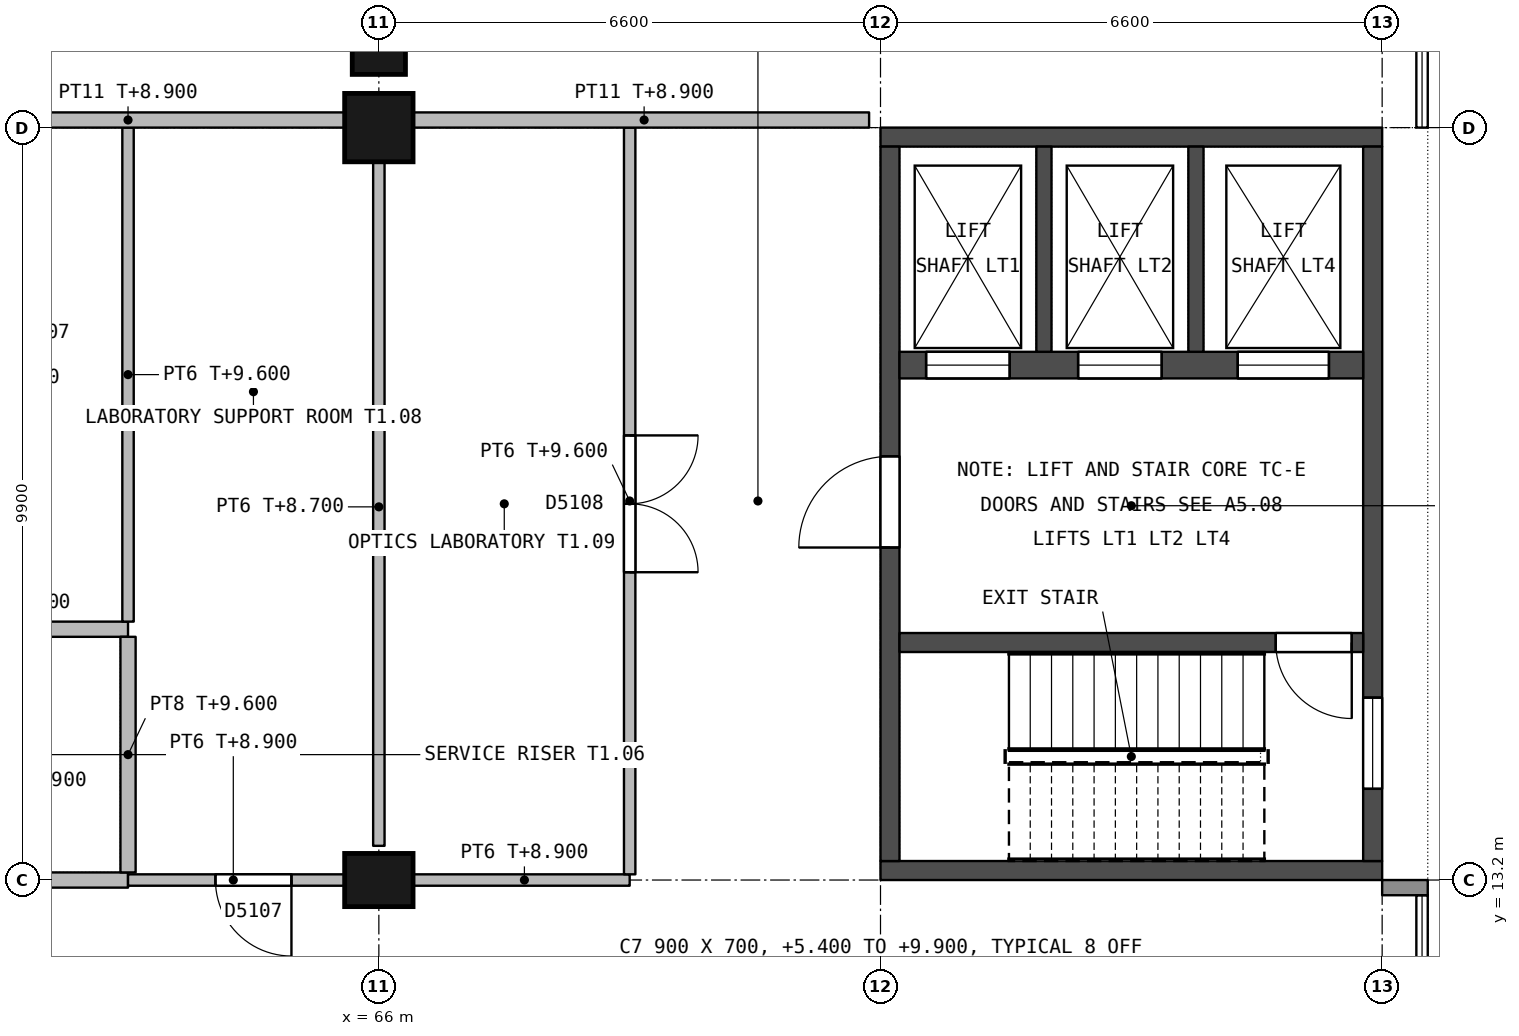
"""IFC4 building model, lengths in metres.
Left out: names, types, materials, properties, quantities, classifications, styles, units other than length and angle.
Written with IfcOpenShell. Run it as: python <this file> out.ifc"""

import sys

from ifc_helpers import new_model, si_unit, direction, frame, frame_2d, origin, origin_2d, place, context, subcontext, project, spatial, rectangle, extrude, element, fill, save


model = new_model("IFC4")
c1 = context("Model", 3, precision=1e-05, world=origin(), true_north=direction((0.0, 1.0)))
c2 = subcontext(c1, "Body", "Model", "MODEL_VIEW")
j1 = project(units=[si_unit("LENGTHUNIT", "METRE"), si_unit("PLANEANGLEUNIT", "RADIAN")], contexts=[c1])
p1 = place(None, origin())
s1 = spatial("IfcSite", under=j1, at=p1, CompositionType="ELEMENT")
p2 = place(p1, origin())
s2 = spatial("IfcBuilding", under=s1, at=p2, CompositionType="ELEMENT")
p3 = place(p2, frame((0.0, 0.0, 5.4)))
s3 = spatial("IfcBuildingStorey", under=s2, at=p3, CompositionType="ELEMENT", Elevation=5.4)
p4 = place(p3, frame((66.0, 13.2, 0.0), z_axis=(0.0, 0.0, 1.0), x_axis=(1.0, 0.0, 0.0)))
e1 = element("IfcColumn", 1, at=p4, inside=s3, PredefinedType="COLUMN", context=c2, shape_type="SweptSolid", body=[
    extrude(rectangle(XDim=0.9, YDim=0.7, at=origin_2d()), origin(), (0.0, 0.0, 1.0), 4.5),
])
p5 = place(p3, frame((66.0, 23.1, 0.0), z_axis=(0.0, 0.0, 1.0), x_axis=(1.0, 0.0, 0.0)))
e2 = element("IfcColumn", 2, at=p5, inside=s3, PredefinedType="COLUMN", context=c2, shape_type="SweptSolid", body=[
    extrude(rectangle(XDim=0.9, YDim=0.9, at=origin_2d()), origin(), (0.0, 0.0, 1.0), 4.5),
])
p6 = place(p3, frame((66.0, 24.15, 0.0), z_axis=(0.0, 0.0, 1.0), x_axis=(1.0, 0.0, 0.0)))
e3 = element("IfcColumn", 3, at=p6, inside=s3, PredefinedType="COLUMN", context=c2, shape_type="SweptSolid", body=[
    extrude(rectangle(XDim=0.7, YDim=0.7, at=origin_2d()), origin(), (0.0, 0.0, 1.0), 4.5),
])
for number, where, z_axis, x_axis in (
    (4, (72.6, 13.325, 0.0), (0.0, 0.0, 1.0), (1.0, 0.0, 0.0)),
    (5, (72.6, 22.975, 0.0), (0.0, 0.0, 1.0), (1.0, 0.0, 0.0)),
):
    element("IfcWall", number, at=place(p3, frame(where, z_axis=z_axis, x_axis=x_axis)), inside=s3, PredefinedType="SHEAR", context=c2, shape_type="SweptSolid", body=[
        extrude(rectangle(XDim=6.6, YDim=0.25, at=frame_2d((3.3, 0.0))), origin(), (0.0, 0.0, 1.0), 4.2),
    ])
p7 = place(p3, frame((72.725, 13.45, 0.0), z_axis=(0.0, 0.0, 1.0), x_axis=(0.0, 1.0, 0.0)))
e6 = element("IfcWall", 6, at=p7, inside=s3, PredefinedType="SHEAR", context=c2, shape_type="SweptSolid", body=[
    extrude(rectangle(XDim=9.4, YDim=0.25, at=frame_2d((4.7, 0.0))), origin(), (0.0, 0.0, 1.0), 4.2),
])
p8 = place(p7, frame((4.125, 0.0, 0.0)))
e7 = element("IfcOpeningElement", 7, at=p8, cuts=e6, PredefinedType="OPENING", context=c2, shape_type="SweptSolid", body=[
    extrude(rectangle(XDim=1.2, YDim=2.1, at=frame_2d((0.6, 1.05))), frame((0.0, 0.135, 0.0), z_axis=(0.0, -1.0, 0.0), x_axis=(1.0, 0.0, 0.0)), (0.0, 0.0, 1.0), 0.27),
])
p9 = place(p3, frame((79.075, 13.45, 0.0), z_axis=(0.0, 0.0, 1.0), x_axis=(0.0, 1.0, 0.0)))
e8 = element("IfcWall", 8, at=p9, inside=s3, PredefinedType="SHEAR", context=c2, shape_type="SweptSolid", body=[
    extrude(rectangle(XDim=9.4, YDim=0.25, at=frame_2d((4.7, 0.0))), origin(), (0.0, 0.0, 1.0), 4.2),
])
p10 = place(p9, frame((0.95, 0.0, 0.7)))
e9 = element("IfcOpeningElement", 9, at=p10, cuts=e8, PredefinedType="OPENING", context=c2, shape_type="SweptSolid", body=[
    extrude(rectangle(XDim=1.2, YDim=1.8, at=frame_2d((0.6, 0.9))), frame((0.0, 0.135, 0.0), z_axis=(0.0, -1.0, 0.0), x_axis=(1.0, 0.0, 0.0)), (0.0, 0.0, 1.0), 0.27),
])
p11 = place(p3, frame((72.85, 16.325, 0.0), z_axis=(0.0, 0.0, 1.0), x_axis=(1.0, 0.0, 0.0)))
e10 = element("IfcWall", 10, at=p11, inside=s3, PredefinedType="SHEAR", context=c2, shape_type="SweptSolid", body=[
    extrude(rectangle(XDim=6.1, YDim=0.25, at=frame_2d((3.05, 0.0))), origin(), (0.0, 0.0, 1.0), 4.2),
])
p12 = place(p11, frame((4.95, 0.0, 0.0)))
e11 = element("IfcOpeningElement", 11, at=p12, cuts=e10, PredefinedType="OPENING", context=c2, shape_type="SweptSolid", body=[
    extrude(rectangle(XDim=1.0, YDim=2.2, at=frame_2d((0.5, 1.1))), frame((0.0, 0.135, 0.0), z_axis=(0.0, -1.0, 0.0), x_axis=(1.0, 0.0, 0.0)), (0.0, 0.0, 1.0), 0.27),
])
p13 = place(p3, frame((72.85, 19.975, 0.0), z_axis=(0.0, 0.0, 1.0), x_axis=(1.0, 0.0, 0.0)))
e12 = element("IfcWall", 12, at=p13, inside=s3, PredefinedType="SHEAR", context=c2, shape_type="SweptSolid", body=[
    extrude(rectangle(XDim=6.1, YDim=0.35, at=frame_2d((3.05, 0.0))), origin(), (0.0, 0.0, 1.0), 4.2),
])
p14 = place(p13, frame((0.35, 0.0, 0.0)))
e13 = element("IfcOpeningElement", 13, at=p14, cuts=e12, PredefinedType="OPENING", context=c2, shape_type="SweptSolid", body=[
    extrude(rectangle(XDim=1.1, YDim=2.2, at=frame_2d((0.55, 1.1))), frame((0.0, 0.185, 0.0), z_axis=(0.0, -1.0, 0.0), x_axis=(1.0, 0.0, 0.0)), (0.0, 0.0, 1.0), 0.37),
])
p15 = place(p13, frame((2.35, 0.0, 0.0)))
e14 = element("IfcOpeningElement", 14, at=p15, cuts=e12, PredefinedType="OPENING", context=c2, shape_type="SweptSolid", body=[
    extrude(rectangle(XDim=1.1, YDim=2.2, at=frame_2d((0.55, 1.1))), frame((0.0, 0.185, 0.0), z_axis=(0.0, -1.0, 0.0), x_axis=(1.0, 0.0, 0.0)), (0.0, 0.0, 1.0), 0.37),
])
p16 = place(p13, frame((4.45, 0.0, 0.0)))
e15 = element("IfcOpeningElement", 15, at=p16, cuts=e12, PredefinedType="OPENING", context=c2, shape_type="SweptSolid", body=[
    extrude(rectangle(XDim=1.2, YDim=2.3, at=frame_2d((0.6, 1.15))), frame((0.0, 0.185, 0.0), z_axis=(0.0, -1.0, 0.0), x_axis=(1.0, 0.0, 0.0)), (0.0, 0.0, 1.0), 0.37),
])
for number, where, z_axis, x_axis in (
    (16, (74.75, 20.15, 0.0), (0.0, 0.0, 1.0), (0.0, 1.0, 0.0)),
    (17, (76.75, 20.15, 0.0), (0.0, 0.0, 1.0), (0.0, 1.0, 0.0)),
):
    element("IfcWall", number, at=place(p3, frame(where, z_axis=z_axis, x_axis=x_axis)), inside=s3, PredefinedType="SHEAR", context=c2, shape_type="SweptSolid", body=[
        extrude(rectangle(XDim=2.7, YDim=0.2, at=frame_2d((1.35, 0.0))), origin(), (0.0, 0.0, 1.0), 4.2),
    ])
p17 = place(p3, frame((79.2, 13.1, 0.0), z_axis=(0.0, 0.0, 1.0), x_axis=(1.0, 0.0, 0.0)))
e18 = element("IfcWall", 18, at=p17, inside=s3, PredefinedType="STANDARD", context=c2, shape_type="SweptSolid", body=[
    extrude(rectangle(XDim=0.6, YDim=0.2, at=frame_2d((0.3, 0.0))), origin(), (0.0, 0.0, 1.0), 3.5),
])
p18 = place(p3, frame((59.85, 13.2, 0.0), z_axis=(0.0, 0.0, 1.0), x_axis=(1.0, 0.0, 0.0)))
e19 = element("IfcWall", 19, at=p18, inside=s3, PredefinedType="PARTITIONING", context=c2, shape_type="SweptSolid", body=[
    extrude(rectangle(XDim=2.85, YDim=0.2, at=frame_2d((1.425, 0.0))), origin(), (0.0, 0.0, 1.0), 3.5),
])
p19 = place(p18, frame((0.9, 0.0, 0.0)))
e20 = element("IfcOpeningElement", 20, at=p19, cuts=e19, PredefinedType="OPENING", context=c2, shape_type="SweptSolid", body=[
    extrude(rectangle(XDim=0.6, YDim=2.1, at=frame_2d((0.3, 1.05))), frame((0.0, 0.11, 0.0), z_axis=(0.0, -1.0, 0.0), x_axis=(1.0, 0.0, 0.0)), (0.0, 0.0, 1.0), 0.22),
])
p20 = place(p3, frame((62.7, 13.2, 0.0), z_axis=(0.0, 0.0, 1.0), x_axis=(1.0, 0.0, 0.0)))
e21 = element("IfcWall", 21, at=p20, inside=s3, PredefinedType="PARTITIONING", context=c2, shape_type="SweptSolid", body=[
    extrude(rectangle(XDim=2.85, YDim=0.15, at=frame_2d((1.425, 0.0))), origin(), (0.0, 0.0, 1.0), 3.5),
])
p21 = place(p20, frame((1.15, 0.0, 0.0)))
e22 = element("IfcOpeningElement", 22, at=p21, cuts=e21, PredefinedType="OPENING", context=c2, shape_type="SweptSolid", body=[
    extrude(rectangle(XDim=1.0, YDim=2.1, at=frame_2d((0.5, 1.05))), frame((0.0, 0.085, 0.0), z_axis=(0.0, -1.0, 0.0), x_axis=(1.0, 0.0, 0.0)), (0.0, 0.0, 1.0), 0.17),
])
p22 = place(p3, frame((69.3, 13.2, 0.0), z_axis=(0.0, 0.0, 1.0), x_axis=(-1.0, 0.0, 0.0)))
e23 = element("IfcWall", 23, at=p22, inside=s3, PredefinedType="PARTITIONING", context=c2, shape_type="SweptSolid", body=[
    extrude(rectangle(XDim=2.85, YDim=0.15, at=frame_2d((1.425, 0.0))), origin(), (0.0, 0.0, 1.0), 3.5),
])
p23 = place(p3, frame((62.7, 16.5, 0.0), z_axis=(0.0, 0.0, 1.0), x_axis=(-1.0, 0.0, 0.0)))
e24 = element("IfcWall", 24, at=p23, inside=s3, PredefinedType="PARTITIONING", context=c2, shape_type="SweptSolid", body=[
    extrude(rectangle(XDim=3.2, YDim=0.2, at=frame_2d((1.6, 0.0))), origin(), (0.0, 0.0, 1.0), 3.6),
])
p24 = place(p3, frame((62.7, 13.3, 0.0), z_axis=(0.0, 0.0, 1.0), x_axis=(0.0, 1.0, 0.0)))
e25 = element("IfcWall", 25, at=p24, inside=s3, PredefinedType="PARTITIONING", context=c2, shape_type="SweptSolid", body=[
    extrude(rectangle(XDim=3.1, YDim=0.2, at=frame_2d((1.55, 0.0))), origin(), (0.0, 0.0, 1.0), 4.2),
])
p25 = place(p3, frame((62.7, 16.6, 0.0), z_axis=(0.0, 0.0, 1.0), x_axis=(0.0, 1.0, 0.0)))
e26 = element("IfcWall", 26, at=p25, inside=s3, PredefinedType="PARTITIONING", context=c2, shape_type="SweptSolid", body=[
    extrude(rectangle(XDim=6.5, YDim=0.15, at=frame_2d((3.25, 0.0))), origin(), (0.0, 0.0, 1.0), 4.2),
])
p26 = place(p3, frame((66.0, 13.65, 0.0), z_axis=(0.0, 0.0, 1.0), x_axis=(0.0, 1.0, 0.0)))
e27 = element("IfcWall", 27, at=p26, inside=s3, PredefinedType="PARTITIONING", context=c2, shape_type="SweptSolid", body=[
    extrude(rectangle(XDim=9.0, YDim=0.15, at=frame_2d((4.5, 0.0))), origin(), (0.0, 0.0, 1.0), 3.3),
])
p27 = place(p3, frame((69.3, 23.1, 0.0), z_axis=(0.0, 0.0, 1.0), x_axis=(0.0, -1.0, 0.0)))
e28 = element("IfcWall", 28, at=p27, inside=s3, PredefinedType="PARTITIONING", context=c2, shape_type="SweptSolid", body=[
    extrude(rectangle(XDim=9.825, YDim=0.15, at=frame_2d((4.913, 0.0))), origin(), (0.0, 0.0, 1.0), 4.2),
])
p28 = place(p27, frame((4.05, 0.0, 0.0)))
e29 = element("IfcOpeningElement", 29, at=p28, cuts=e28, PredefinedType="OPENING", context=c2, shape_type="SweptSolid", body=[
    extrude(rectangle(XDim=1.8, YDim=2.4, at=frame_2d((0.9, 1.2))), frame((0.0, 0.085, 0.0), z_axis=(0.0, -1.0, 0.0), x_axis=(1.0, 0.0, 0.0)), (0.0, 0.0, 1.0), 0.17),
])
p29 = place(p3, frame((59.85, 23.2, 0.0), z_axis=(0.0, 0.0, 1.0), x_axis=(1.0, 0.0, 0.0)))
e30 = element("IfcWall", 30, at=p29, inside=s3, PredefinedType="PARTITIONING", context=c2, shape_type="SweptSolid", body=[
    extrude(rectangle(XDim=5.7, YDim=0.2, at=frame_2d((2.85, 0.0))), origin(), (0.0, 0.0, 1.0), 3.5),
])
p30 = place(p3, frame((66.45, 23.2, 0.0), z_axis=(0.0, 0.0, 1.0), x_axis=(1.0, 0.0, 0.0)))
e31 = element("IfcWall", 31, at=p30, inside=s3, PredefinedType="PARTITIONING", context=c2, shape_type="SweptSolid", body=[
    extrude(rectangle(XDim=6.0, YDim=0.2, at=frame_2d((3.0, 0.0))), origin(), (0.0, 0.0, 1.0), 3.5),
])
p31 = place(p8, origin())
e32 = element("IfcDoor", 32, at=p31, inside=s3, OperationType="SINGLE_SWING_LEFT", PredefinedType="DOOR", context=c2, shape_type="SweptSolid", body=[
    extrude(rectangle(XDim=1.2, YDim=2.1, at=frame_2d((0.6, 1.05))), frame((0.0, 0.025, 0.0), z_axis=(0.0, -1.0, 0.0), x_axis=(1.0, 0.0, 0.0)), (0.0, 0.0, 1.0), 0.05),
])
fill(e7, e32)
p32 = place(p12, origin())
e33 = element("IfcDoor", 33, at=p32, inside=s3, OperationType="SINGLE_SWING_RIGHT", PredefinedType="DOOR", context=c2, shape_type="SweptSolid", body=[
    extrude(rectangle(XDim=1.0, YDim=2.2, at=frame_2d((0.5, 1.1))), frame((0.0, 0.025, 0.0), z_axis=(0.0, -1.0, 0.0), x_axis=(1.0, 0.0, 0.0)), (0.0, 0.0, 1.0), 0.05),
])
fill(e11, e33)
p33 = place(p14, origin())
e34 = element("IfcDoor", 34, at=p33, inside=s3, OperationType="DOUBLE_DOOR_SLIDING", PredefinedType="NOTDEFINED", context=c2, shape_type="SweptSolid", body=[
    extrude(rectangle(XDim=1.1, YDim=2.2, at=frame_2d((0.55, 1.1))), frame((0.0, 0.025, 0.0), z_axis=(0.0, -1.0, 0.0), x_axis=(1.0, 0.0, 0.0)), (0.0, 0.0, 1.0), 0.05),
])
fill(e13, e34)
p34 = place(p15, origin())
e35 = element("IfcDoor", 35, at=p34, inside=s3, OperationType="DOUBLE_DOOR_SLIDING", PredefinedType="NOTDEFINED", context=c2, shape_type="SweptSolid", body=[
    extrude(rectangle(XDim=1.1, YDim=2.2, at=frame_2d((0.55, 1.1))), frame((0.0, 0.025, 0.0), z_axis=(0.0, -1.0, 0.0), x_axis=(1.0, 0.0, 0.0)), (0.0, 0.0, 1.0), 0.05),
])
fill(e14, e35)
p35 = place(p16, origin())
e36 = element("IfcDoor", 36, at=p35, inside=s3, OperationType="DOUBLE_DOOR_SLIDING", PredefinedType="NOTDEFINED", context=c2, shape_type="SweptSolid", body=[
    extrude(rectangle(XDim=1.2, YDim=2.3, at=frame_2d((0.6, 1.15))), frame((0.0, 0.025, 0.0), z_axis=(0.0, -1.0, 0.0), x_axis=(1.0, 0.0, 0.0)), (0.0, 0.0, 1.0), 0.05),
])
fill(e15, e36)
p36 = place(p10, origin())
e37 = element("IfcWindow", 37, at=p36, inside=s3, PartitioningType="SINGLE_PANEL", PredefinedType="WINDOW", context=c2, shape_type="SweptSolid", body=[
    extrude(rectangle(XDim=1.2, YDim=1.8, at=frame_2d((0.6, 0.9))), frame((0.0, 0.03, 0.0), z_axis=(0.0, -1.0, 0.0), x_axis=(1.0, 0.0, 0.0)), (0.0, 0.0, 1.0), 0.06),
])
fill(e9, e37)
p37 = place(p21, origin())
e38 = element("IfcDoor", 38, at=p37, inside=s3, OperationType="SINGLE_SWING_RIGHT", PredefinedType="DOOR", context=c2, shape_type="SweptSolid", body=[
    extrude(rectangle(XDim=1.0, YDim=2.1, at=frame_2d((0.5, 1.05))), frame((0.0, 0.027, 0.0), z_axis=(0.0, -1.0, 0.0), x_axis=(1.0, 0.0, 0.0)), (0.0, 0.0, 1.0), 0.054),
])
fill(e22, e38)
p38 = place(p28, origin())
e39 = element("IfcDoor", 39, at=p38, inside=s3, OperationType="DOUBLE_DOOR_SINGLE_SWING", PredefinedType="DOOR", context=c2, shape_type="SweptSolid", body=[
    extrude(rectangle(XDim=1.8, YDim=2.4, at=frame_2d((0.9, 1.2))), frame((0.0, 0.027, 0.0), z_axis=(0.0, -1.0, 0.0), x_axis=(1.0, 0.0, 0.0)), (0.0, 0.0, 1.0), 0.054),
])
fill(e29, e39)
save(model, sys.argv[1])
